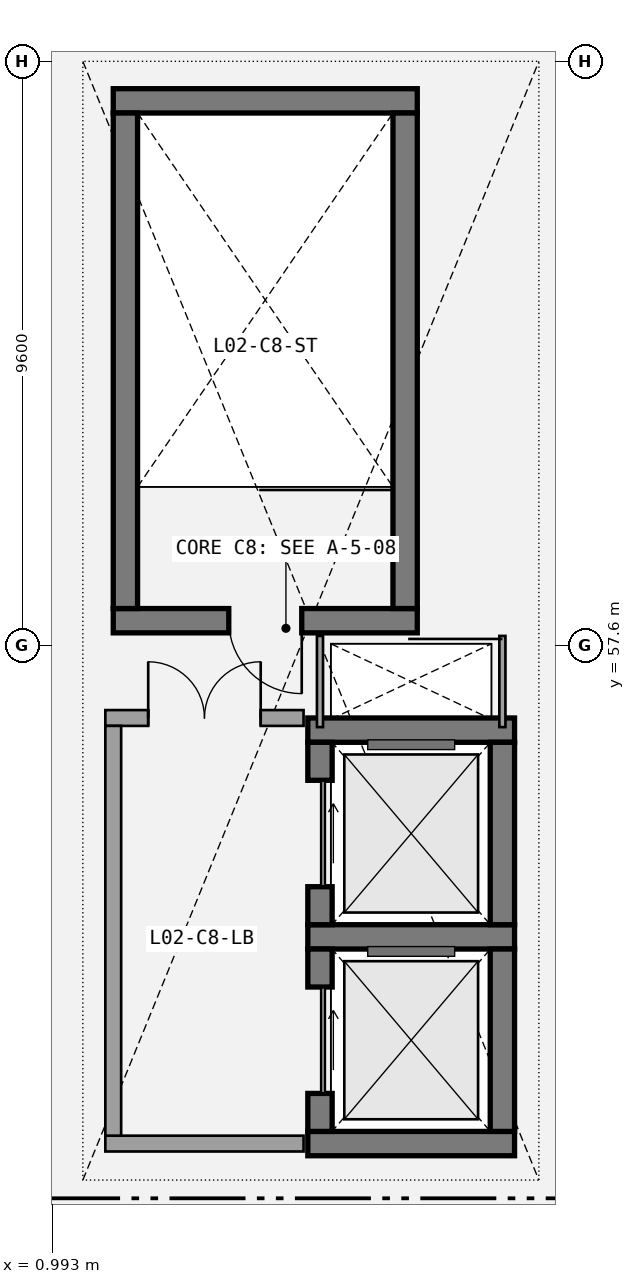
"""IFC4 building model, lengths in metres.
Left out: names, types, materials, properties, quantities, classifications, styles, units other than length and angle.
Written with IfcOpenShell. Run it as: python <this file> out.ifc"""

import sys

from ifc_helpers import new_model, si_unit, direction, frame, frame_2d, origin, place, context, subcontext, project, spatial, rectangle, extrude, element, fill, save


model = new_model("IFC4")
c1 = context("Model", 3, precision=1e-05, world=origin(), true_north=direction((0.0, 1.0)))
c2 = subcontext(c1, "Body", "Model", "MODEL_VIEW")
j1 = project(units=[si_unit("LENGTHUNIT", "METRE"), si_unit("PLANEANGLEUNIT", "RADIAN")], contexts=[c1])
p1 = place(None, origin())
s1 = spatial("IfcSite", under=j1, at=p1, CompositionType="ELEMENT")
p2 = place(p1, origin())
s2 = spatial("IfcBuilding", under=s1, at=p2, CompositionType="ELEMENT")
p3 = place(p2, frame((0.0, 0.0, 9.6)))
s3 = spatial("IfcBuildingStorey", under=s2, at=p3, CompositionType="ELEMENT", Elevation=9.6)
p4 = place(p3, frame((2.0, 58.0, 0.0), z_axis=(0.0, 0.0, 1.0), x_axis=(1.0, 0.0, 0.0)))
e1 = element("IfcWall", 1, at=p4, inside=s3, PredefinedType="SHEAR", context=c2, shape_type="SweptSolid", body=[
    extrude(rectangle(XDim=5.0, YDim=0.4, at=frame_2d((2.5, 0.0))), origin(), (0.0, 0.0, 1.0), 4.22),
])
p5 = place(p4, frame((3.1, 0.0, 0.0), z_axis=(0.0, 0.0, 1.0), x_axis=(-1.0, 0.0, 0.0)))
e2 = element("IfcOpeningElement", 2, at=p5, cuts=e1, PredefinedType="OPENING", context=c2, shape_type="SweptSolid", body=[
    extrude(rectangle(XDim=1.2, YDim=2.2, at=frame_2d((0.6, 1.1))), frame((0.0, 0.21, 0.0), z_axis=(0.0, -1.0, 0.0), x_axis=(1.0, 0.0, 0.0)), (0.0, 0.0, 1.0), 0.42),
])
p6 = place(p3, frame((7.0, 66.55, 0.0), z_axis=(0.0, 0.0, 1.0), x_axis=(-1.0, 0.0, 0.0)))
e3 = element("IfcWall", 3, at=p6, inside=s3, PredefinedType="SHEAR", context=c2, shape_type="SweptSolid", body=[
    extrude(rectangle(XDim=5.0, YDim=0.4, at=frame_2d((2.5, 0.0))), origin(), (0.0, 0.0, 1.0), 4.22),
])
for number, where, z_axis, x_axis in (
    (4, (2.2, 66.35, 0.0), (0.0, 0.0, 1.0), (0.0, -1.0, 0.0)),
    (5, (6.8, 58.2, 0.0), (0.0, 0.0, 1.0), (0.0, 1.0, 0.0)),
):
    element("IfcWall", number, at=place(p3, frame(where, z_axis=z_axis, x_axis=x_axis)), inside=s3, PredefinedType="SHEAR", context=c2, shape_type="SweptSolid", body=[
        extrude(rectangle(XDim=8.15, YDim=0.4, at=frame_2d((4.075, 0.0))), origin(), (0.0, 0.0, 1.0), 4.22),
    ])
for number, where, z_axis, x_axis in (
    (6, (5.2, 49.4, 0.0), (0.0, 0.0, 1.0), (1.0, 0.0, 0.0)),
    (7, (8.6, 52.8, 0.0), (0.0, 0.0, 1.0), (-1.0, 0.0, 0.0)),
):
    element("IfcWall", number, at=place(p3, frame(where, z_axis=z_axis, x_axis=x_axis)), inside=s3, PredefinedType="SHEAR", context=c2, shape_type="SweptSolid", body=[
        extrude(rectangle(XDim=3.4, YDim=0.4, at=frame_2d((1.7, 0.0))), origin(), (0.0, 0.0, 1.0), 4.22),
    ])
p7 = place(p3, frame((5.4, 52.6, 0.0), z_axis=(0.0, 0.0, 1.0), x_axis=(0.0, -1.0, 0.0)))
e8 = element("IfcWall", 8, at=p7, inside=s3, PredefinedType="SHEAR", context=c2, shape_type="SweptSolid", body=[
    extrude(rectangle(XDim=3.0, YDim=0.4, at=frame_2d((1.5, 0.0))), origin(), (0.0, 0.0, 1.0), 4.22),
])
p8 = place(p7, frame((0.625, 0.0, 0.0), z_axis=(0.0, 0.0, 1.0), x_axis=(1.0, 0.0, 0.0)))
e9 = element("IfcOpeningElement", 9, at=p8, cuts=e8, PredefinedType="OPENING", context=c2, shape_type="SweptSolid", body=[
    extrude(rectangle(XDim=1.75, YDim=2.35, at=frame_2d((0.875, 1.175))), frame((0.0, 0.21, 0.0), z_axis=(0.0, -1.0, 0.0), x_axis=(1.0, 0.0, 0.0)), (0.0, 0.0, 1.0), 0.42),
])
p9 = place(p3, frame((8.4, 49.6, 0.0), z_axis=(0.0, 0.0, 1.0), x_axis=(0.0, 1.0, 0.0)))
e10 = element("IfcWall", 10, at=p9, inside=s3, PredefinedType="SHEAR", context=c2, shape_type="SweptSolid", body=[
    extrude(rectangle(XDim=3.0, YDim=0.4, at=frame_2d((1.5, 0.0))), origin(), (0.0, 0.0, 1.0), 4.22),
])
p10 = place(p3, frame((8.6, 56.2, 0.0), z_axis=(0.0, 0.0, 1.0), x_axis=(-1.0, 0.0, 0.0)))
e11 = element("IfcWall", 11, at=p10, inside=s3, PredefinedType="SHEAR", context=c2, shape_type="SweptSolid", body=[
    extrude(rectangle(XDim=3.4, YDim=0.4, at=frame_2d((1.7, 0.0))), origin(), (0.0, 0.0, 1.0), 4.22),
])
p11 = place(p3, frame((5.4, 56.0, 0.0), z_axis=(0.0, 0.0, 1.0), x_axis=(0.0, -1.0, 0.0)))
e12 = element("IfcWall", 12, at=p11, inside=s3, PredefinedType="SHEAR", context=c2, shape_type="SweptSolid", body=[
    extrude(rectangle(XDim=3.0, YDim=0.4, at=frame_2d((1.5, 0.0))), origin(), (0.0, 0.0, 1.0), 4.22),
])
p12 = place(p11, frame((0.625, 0.0, 0.0), z_axis=(0.0, 0.0, 1.0), x_axis=(1.0, 0.0, 0.0)))
e13 = element("IfcOpeningElement", 13, at=p12, cuts=e12, PredefinedType="OPENING", context=c2, shape_type="SweptSolid", body=[
    extrude(rectangle(XDim=1.75, YDim=2.35, at=frame_2d((0.875, 1.175))), frame((0.0, 0.21, 0.0), z_axis=(0.0, -1.0, 0.0), x_axis=(1.0, 0.0, 0.0)), (0.0, 0.0, 1.0), 0.42),
])
p13 = place(p3, frame((8.4, 53.0, 0.0), z_axis=(0.0, 0.0, 1.0), x_axis=(0.0, 1.0, 0.0)))
e14 = element("IfcWall", 14, at=p13, inside=s3, PredefinedType="SHEAR", context=c2, shape_type="SweptSolid", body=[
    extrude(rectangle(XDim=3.0, YDim=0.4, at=frame_2d((1.5, 0.0))), origin(), (0.0, 0.0, 1.0), 4.22),
])
for number, where, z_axis, x_axis in (
    (15, (5.4, 57.75, 0.0), (0.0, 0.0, 1.0), (0.0, -1.0, 0.0)),
    (16, (8.4, 56.25, 0.0), (0.0, 0.0, 1.0), (0.0, 1.0, 0.0)),
):
    element("IfcWall", number, at=place(p3, frame(where, z_axis=z_axis, x_axis=x_axis)), inside=s3, PredefinedType="PARTITIONING", context=c2, shape_type="SweptSolid", body=[
        extrude(rectangle(XDim=1.5, YDim=0.1, at=frame_2d((0.75, 0.0))), origin(), (0.0, 0.0, 1.0), 4.22),
    ])
p14 = place(p3, frame((1.87, 49.4, 0.0), z_axis=(0.0, 0.0, 1.0), x_axis=(1.0, 0.0, 0.0)))
e17 = element("IfcWall", 17, at=p14, inside=s3, PredefinedType="SOLIDWALL", context=c2, shape_type="SweptSolid", body=[
    extrude(rectangle(XDim=3.26, YDim=0.26, at=frame_2d((1.63, 0.0))), origin(), (0.0, 0.0, 1.0), 4.22),
])
p15 = place(p3, frame((5.13, 56.4, 0.0), z_axis=(0.0, 0.0, 1.0), x_axis=(-1.0, 0.0, 0.0)))
e18 = element("IfcWall", 18, at=p15, inside=s3, PredefinedType="SOLIDWALL", context=c2, shape_type="SweptSolid", body=[
    extrude(rectangle(XDim=3.26, YDim=0.26, at=frame_2d((1.63, 0.0))), origin(), (0.0, 0.0, 1.0), 4.22),
])
p16 = place(p15, frame((2.555, 0.0, 0.0), z_axis=(0.0, 0.0, 1.0), x_axis=(-1.0, 0.0, 0.0)))
e19 = element("IfcOpeningElement", 19, at=p16, cuts=e18, PredefinedType="OPENING", context=c2, shape_type="SweptSolid", body=[
    extrude(rectangle(XDim=1.85, YDim=2.25, at=frame_2d((0.925, 1.125))), frame((0.0, 0.14, 0.0), z_axis=(0.0, -1.0, 0.0), x_axis=(1.0, 0.0, 0.0)), (0.0, 0.0, 1.0), 0.28),
])
p17 = place(p3, frame((2.0, 56.27, 0.0), z_axis=(0.0, 0.0, 1.0), x_axis=(0.0, -1.0, 0.0)))
e20 = element("IfcWall", 20, at=p17, inside=s3, PredefinedType="SOLIDWALL", context=c2, shape_type="SweptSolid", body=[
    extrude(rectangle(XDim=6.74, YDim=0.26, at=frame_2d((3.37, 0.0))), origin(), (0.0, 0.0, 1.0), 4.22),
])
p18 = place(p5, origin())
e21 = element("IfcDoor", 21, at=p18, inside=s3, OperationType="SINGLE_SWING_LEFT", PredefinedType="DOOR", context=c2, shape_type="SweptSolid", body=[
    extrude(rectangle(XDim=1.2, YDim=2.2, at=frame_2d((0.6, 1.1))), frame((0.0, 0.025, 0.0), z_axis=(0.0, -1.0, 0.0), x_axis=(1.0, 0.0, 0.0)), (0.0, 0.0, 1.0), 0.05),
])
fill(e2, e21)
p19 = place(p8, origin())
e22 = element("IfcDoor", 22, at=p19, inside=s3, OperationType="SLIDING_TO_LEFT", PredefinedType="DOOR", context=c2, shape_type="SweptSolid", body=[
    extrude(rectangle(XDim=1.75, YDim=2.35, at=frame_2d((0.875, 1.175))), frame((0.0, 0.025, 0.0), z_axis=(0.0, -1.0, 0.0), x_axis=(1.0, 0.0, 0.0)), (0.0, 0.0, 1.0), 0.05),
])
fill(e9, e22)
p20 = place(p12, origin())
e23 = element("IfcDoor", 23, at=p20, inside=s3, OperationType="SLIDING_TO_LEFT", PredefinedType="DOOR", context=c2, shape_type="SweptSolid", body=[
    extrude(rectangle(XDim=1.75, YDim=2.35, at=frame_2d((0.875, 1.175))), frame((0.0, 0.025, 0.0), z_axis=(0.0, -1.0, 0.0), x_axis=(1.0, 0.0, 0.0)), (0.0, 0.0, 1.0), 0.05),
])
fill(e13, e23)
p21 = place(p16, origin())
e24 = element("IfcDoor", 24, at=p21, inside=s3, OperationType="DOUBLE_DOOR_SINGLE_SWING", PredefinedType="DOOR", context=c2, shape_type="SweptSolid", body=[
    extrude(rectangle(XDim=1.85, YDim=2.25, at=frame_2d((0.925, 1.125))), frame((0.0, 0.025, 0.0), z_axis=(0.0, -1.0, 0.0), x_axis=(1.0, 0.0, 0.0)), (0.0, 0.0, 1.0), 0.05),
])
fill(e19, e24)
save(model, sys.argv[1])
